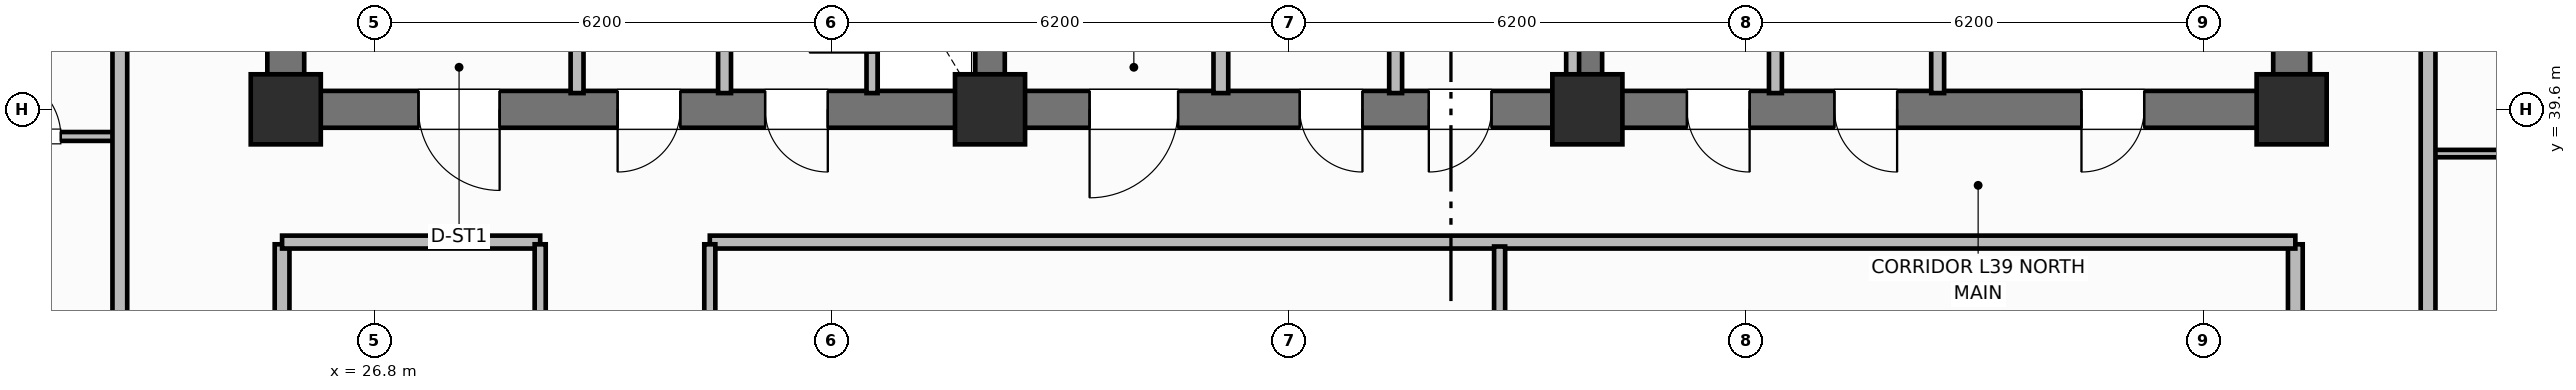
"""IFC4 building model, lengths in metres.
Left out: names, types, materials, properties, quantities, classifications, styles, units other than length and angle.
Written with IfcOpenShell. Run it as: python <this file> out.ifc"""

import sys

from ifc_helpers import new_model, si_unit, direction, frame, frame_2d, origin, origin_2d, place, context, subcontext, project, spatial, rectangle, extrude, element, fill, save


model = new_model("IFC4")
c1 = context("Model", 3, precision=1e-05, world=origin(), true_north=direction((0.0, 1.0)))
c2 = subcontext(c1, "Body", "Model", "MODEL_VIEW")
j1 = project(units=[si_unit("LENGTHUNIT", "METRE"), si_unit("PLANEANGLEUNIT", "RADIAN")], contexts=[c1])
p1 = place(None, origin())
s1 = spatial("IfcSite", under=j1, at=p1, CompositionType="ELEMENT")
p2 = place(p1, origin())
s2 = spatial("IfcBuilding", under=s1, at=p2, CompositionType="ELEMENT")
p3 = place(p2, frame((0.0, 0.0, 158.9)))
s3 = spatial("IfcBuildingStorey", under=s2, at=p3, CompositionType="ELEMENT", Elevation=158.9)
for number, where, z_axis, x_axis in (
    (1, (25.6, 39.85, 0.0), (0.0, 0.0, 1.0), (0.0, 1.0, 0.0)),
    (2, (52.8, 39.85, 0.0), (0.0, 0.0, 1.0), (0.0, 1.0, 0.0)),
):
    element("IfcWall", number, at=place(p3, frame(where, z_axis=z_axis, x_axis=x_axis)), inside=s3, PredefinedType="SHEAR", context=c2, shape_type="SweptSolid", body=[
        extrude(rectangle(XDim=5.7, YDim=0.5, at=frame_2d((2.85, 0.0))), origin(), (0.0, 0.0, 1.0), 3.7),
    ])
p4 = place(p3, frame((52.8, 39.6, 0.0), z_axis=(0.0, 0.0, 1.0), x_axis=(-1.0, 0.0, 0.0)))
e3 = element("IfcWall", 3, at=p4, inside=s3, PredefinedType="SHEAR", context=c2, shape_type="SweptSolid", body=[
    extrude(rectangle(XDim=27.2, YDim=0.5, at=frame_2d((13.6, 0.0))), origin(), (0.0, 0.0, 1.0), 3.7),
])
p5 = place(p4, frame((24.3, 0.0, 0.0)))
e4 = element("IfcOpeningElement", 4, at=p5, cuts=e3, PredefinedType="OPENING", context=c2, shape_type="SweptSolid", body=[
    extrude(rectangle(XDim=1.1, YDim=2.15, at=frame_2d((0.55, 1.075))), frame((0.0, 0.26, 0.0), z_axis=(0.0, -1.0, 0.0), x_axis=(1.0, 0.0, 0.0)), (0.0, 0.0, 1.0), 0.52),
])
p6 = place(p4, frame((21.85, 0.0, 0.0)))
e5 = element("IfcOpeningElement", 5, at=p6, cuts=e3, PredefinedType="OPENING", context=c2, shape_type="SweptSolid", body=[
    extrude(rectangle(XDim=0.85, YDim=2.1, at=frame_2d((0.425, 1.05))), frame((0.0, 0.26, 0.0), z_axis=(0.0, -1.0, 0.0), x_axis=(1.0, 0.0, 0.0)), (0.0, 0.0, 1.0), 0.52),
])
p7 = place(p4, frame((19.85, 0.0, 0.0)))
e6 = element("IfcOpeningElement", 6, at=p7, cuts=e3, PredefinedType="OPENING", context=c2, shape_type="SweptSolid", body=[
    extrude(rectangle(XDim=0.85, YDim=2.1, at=frame_2d((0.425, 1.05))), frame((0.0, 0.26, 0.0), z_axis=(0.0, -1.0, 0.0), x_axis=(1.0, 0.0, 0.0)), (0.0, 0.0, 1.0), 0.52),
])
p8 = place(p4, frame((15.1, 0.0, 0.0)))
e7 = element("IfcOpeningElement", 7, at=p8, cuts=e3, PredefinedType="OPENING", context=c2, shape_type="SweptSolid", body=[
    extrude(rectangle(XDim=1.2, YDim=2.15, at=frame_2d((0.6, 1.075))), frame((0.0, 0.26, 0.0), z_axis=(0.0, -1.0, 0.0), x_axis=(1.0, 0.0, 0.0)), (0.0, 0.0, 1.0), 0.52),
])
p9 = place(p4, frame((12.6, 0.0, 0.0)))
e8 = element("IfcOpeningElement", 8, at=p9, cuts=e3, PredefinedType="OPENING", context=c2, shape_type="SweptSolid", body=[
    extrude(rectangle(XDim=0.85, YDim=2.1, at=frame_2d((0.425, 1.05))), frame((0.0, 0.26, 0.0), z_axis=(0.0, -1.0, 0.0), x_axis=(1.0, 0.0, 0.0)), (0.0, 0.0, 1.0), 0.52),
])
p10 = place(p4, frame((10.85, 0.0, 0.0)))
e9 = element("IfcOpeningElement", 9, at=p10, cuts=e3, PredefinedType="OPENING", context=c2, shape_type="SweptSolid", body=[
    extrude(rectangle(XDim=0.85, YDim=2.1, at=frame_2d((0.425, 1.05))), frame((0.0, 0.26, 0.0), z_axis=(0.0, -1.0, 0.0), x_axis=(1.0, 0.0, 0.0)), (0.0, 0.0, 1.0), 0.52),
])
p11 = place(p4, frame((7.35, 0.0, 0.0)))
e10 = element("IfcOpeningElement", 10, at=p11, cuts=e3, PredefinedType="OPENING", context=c2, shape_type="SweptSolid", body=[
    extrude(rectangle(XDim=0.85, YDim=2.1, at=frame_2d((0.425, 1.05))), frame((0.0, 0.26, 0.0), z_axis=(0.0, -1.0, 0.0), x_axis=(1.0, 0.0, 0.0)), (0.0, 0.0, 1.0), 0.52),
])
p12 = place(p4, frame((5.35, 0.0, 0.0)))
e11 = element("IfcOpeningElement", 11, at=p12, cuts=e3, PredefinedType="OPENING", context=c2, shape_type="SweptSolid", body=[
    extrude(rectangle(XDim=0.85, YDim=2.1, at=frame_2d((0.425, 1.05))), frame((0.0, 0.26, 0.0), z_axis=(0.0, -1.0, 0.0), x_axis=(1.0, 0.0, 0.0)), (0.0, 0.0, 1.0), 0.52),
])
p13 = place(p4, frame((2.0, 0.0, 0.0)))
e12 = element("IfcOpeningElement", 12, at=p13, cuts=e3, PredefinedType="OPENING", context=c2, shape_type="SweptSolid", body=[
    extrude(rectangle(XDim=0.85, YDim=2.1, at=frame_2d((0.425, 1.05))), frame((0.0, 0.26, 0.0), z_axis=(0.0, -1.0, 0.0), x_axis=(1.0, 0.0, 0.0)), (0.0, 0.0, 1.0), 0.52),
])
for number, where, z_axis, x_axis in (
    (13, (35.15, 39.85, 0.0), (0.0, 0.0, 1.0), (0.0, 1.0, 0.0)),
    (14, (43.25, 39.85, 0.0), (0.0, 0.0, 1.0), (0.0, 1.0, 0.0)),
):
    element("IfcWall", number, at=place(p3, frame(where, z_axis=z_axis, x_axis=x_axis)), inside=s3, PredefinedType="SHEAR", context=c2, shape_type="SweptSolid", body=[
        extrude(rectangle(XDim=5.7, YDim=0.4, at=frame_2d((2.85, 0.0))), origin(), (0.0, 0.0, 1.0), 3.7),
    ])
for number, where, z_axis, x_axis in (
    (15, (25.6, 39.6, 0.0), (0.0, 0.0, 1.0), (1.0, 0.0, 0.0)),
    (16, (35.15, 39.6, 0.0), (0.0, 0.0, 1.0), (1.0, 0.0, 0.0)),
    (17, (43.25, 39.6, 0.0), (0.0, 0.0, 1.0), (1.0, 0.0, 0.0)),
    (18, (52.8, 39.6, 0.0), (0.0, 0.0, 1.0), (1.0, 0.0, 0.0)),
):
    element("IfcColumn", number, at=place(p3, frame(where, z_axis=z_axis, x_axis=x_axis)), inside=s3, PredefinedType="COLUMN", context=c2, shape_type="SweptSolid", body=[
        extrude(rectangle(XDim=0.95, YDim=0.95, at=origin_2d()), origin(), (0.0, 0.0, 1.0), 3.7),
    ])
p14 = place(p3, frame((33.55, 39.82, 0.0), z_axis=(0.0, 0.0, 1.0), x_axis=(0.0, 1.0, 0.0)))
e19 = element("IfcWall", 19, at=p14, inside=s3, PredefinedType="PARTITIONING", context=c2, shape_type="SweptSolid", body=[
    extrude(rectangle(XDim=2.13, YDim=0.15, at=frame_2d((1.065, 0.0))), origin(), (0.0, 0.0, 1.0), 2.55),
])
p15 = place(p14, frame((0.55, 0.0, 0.0)))
e20 = element("IfcOpeningElement", 20, at=p15, cuts=e19, PredefinedType="OPENING", context=c2, shape_type="SweptSolid", body=[
    extrude(rectangle(XDim=0.85, YDim=2.05, at=frame_2d((0.425, 1.025))), frame((0.0, 0.085, 0.0), z_axis=(0.0, -1.0, 0.0), x_axis=(1.0, 0.0, 0.0)), (0.0, 0.0, 1.0), 0.17),
])
for number, where, z_axis, x_axis in (
    (21, (29.55, 39.82, 0.0), (0.0, 0.0, 1.0), (0.0, 1.0, 0.0)),
    (22, (31.55, 39.82, 0.0), (0.0, 0.0, 1.0), (0.0, 1.0, 0.0)),
):
    element("IfcWall", number, at=place(p3, frame(where, z_axis=z_axis, x_axis=x_axis)), inside=s3, PredefinedType="PARTITIONING", context=c2, shape_type="SweptSolid", body=[
        extrude(rectangle(XDim=2.13, YDim=0.175, at=frame_2d((1.065, 0.0))), origin(), (0.0, 0.0, 1.0), 2.55),
    ])
p16 = place(p3, frame((38.28, 39.82, 0.0), z_axis=(0.0, 0.0, 1.0), x_axis=(0.0, 1.0, 0.0)))
e23 = element("IfcWall", 23, at=p16, inside=s3, PredefinedType="PARTITIONING", context=c2, shape_type="SweptSolid", body=[
    extrude(rectangle(XDim=5.63, YDim=0.2, at=frame_2d((2.815, 0.0))), origin(), (0.0, 0.0, 1.0), 2.55),
])
for number, where, z_axis, x_axis in (
    (24, (43.05, 39.82, 0.0), (0.0, 0.0, 1.0), (0.0, 1.0, 0.0)),
    (25, (40.65, 39.82, 0.0), (0.0, 0.0, 1.0), (0.0, 1.0, 0.0)),
    (26, (45.8, 39.82, 0.0), (0.0, 0.0, 1.0), (0.0, 1.0, 0.0)),
):
    element("IfcWall", number, at=place(p3, frame(where, z_axis=z_axis, x_axis=x_axis)), inside=s3, PredefinedType="PARTITIONING", context=c2, shape_type="SweptSolid", body=[
        extrude(rectangle(XDim=5.63, YDim=0.175, at=frame_2d((2.815, 0.0))), origin(), (0.0, 0.0, 1.0), 2.55),
    ])
p17 = place(p3, frame((48.0, 39.82, 0.0), z_axis=(0.0, 0.0, 1.0), x_axis=(0.0, 1.0, 0.0)))
e27 = element("IfcWall", 27, at=p17, inside=s3, PredefinedType="PARTITIONING", context=c2, shape_type="SweptSolid", body=[
    extrude(rectangle(XDim=2.73, YDim=0.175, at=frame_2d((1.365, 0.0))), origin(), (0.0, 0.0, 1.0), 2.55),
])
for number, where, z_axis, x_axis in (
    (28, (25.55, 18.63, 0.0), (0.0, 0.0, 1.0), (0.0, 1.0, 0.0)),
    (29, (52.85, 18.63, 0.0), (0.0, 0.0, 1.0), (0.0, 1.0, 0.0)),
):
    element("IfcWall", number, at=place(p3, frame(where, z_axis=z_axis, x_axis=x_axis)), inside=s3, PredefinedType="PARTITIONING", context=c2, shape_type="SweptSolid", body=[
        extrude(rectangle(XDim=19.14, YDim=0.2, at=frame_2d((9.57, 0.0))), origin(), (0.0, 0.0, 1.0), 2.55),
    ])
p18 = place(p3, frame((25.55, 37.8, 0.0), z_axis=(0.0, 0.0, 1.0), x_axis=(1.0, 0.0, 0.0)))
e30 = element("IfcWall", 30, at=p18, inside=s3, PredefinedType="PARTITIONING", context=c2, shape_type="SweptSolid", body=[
    extrude(rectangle(XDim=3.5, YDim=0.175, at=frame_2d((1.75, 0.0))), origin(), (0.0, 0.0, 1.0), 2.55),
])
p19 = place(p3, frame((31.35, 37.8, 0.0), z_axis=(0.0, 0.0, 1.0), x_axis=(1.0, 0.0, 0.0)))
e31 = element("IfcWall", 31, at=p19, inside=s3, PredefinedType="PARTITIONING", context=c2, shape_type="SweptSolid", body=[
    extrude(rectangle(XDim=21.5, YDim=0.175, at=frame_2d((10.75, 0.0))), origin(), (0.0, 0.0, 1.0), 2.55),
])
p20 = place(p3, frame((42.06, 18.66, 0.0), z_axis=(0.0, 0.0, 1.0), x_axis=(0.0, 1.0, 0.0)))
e32 = element("IfcWall", 32, at=p20, inside=s3, PredefinedType="PARTITIONING", context=c2, shape_type="SweptSolid", body=[
    extrude(rectangle(XDim=19.08, YDim=0.15, at=frame_2d((9.54, 0.0))), origin(), (0.0, 0.0, 1.0), 2.55),
])
p21 = place(p20, frame((6.5, 0.0, 0.0)))
e33 = element("IfcOpeningElement", 33, at=p21, cuts=e32, PredefinedType="OPENING", context=c2, shape_type="SweptSolid", body=[
    extrude(rectangle(XDim=1.0, YDim=2.15, at=frame_2d((0.5, 1.075))), frame((0.0, 0.085, 0.0), z_axis=(0.0, -1.0, 0.0), x_axis=(1.0, 0.0, 0.0)), (0.0, 0.0, 1.0), 0.17),
])
p22 = place(p3, frame((29.05, 18.63, 0.0), z_axis=(0.0, 0.0, 1.0), x_axis=(0.0, 1.0, 0.0)))
e34 = element("IfcWall", 34, at=p22, inside=s3, PredefinedType="PARTITIONING", context=c2, shape_type="SweptSolid", body=[
    extrude(rectangle(XDim=19.14, YDim=0.15, at=frame_2d((9.57, 0.0))), origin(), (0.0, 0.0, 1.0), 2.55),
])
p23 = place(p22, frame((5.5, 0.0, 0.0)))
e35 = element("IfcOpeningElement", 35, at=p23, cuts=e34, PredefinedType="OPENING", context=c2, shape_type="SweptSolid", body=[
    extrude(rectangle(XDim=1.0, YDim=2.15, at=frame_2d((0.5, 1.075))), frame((0.0, 0.085, 0.0), z_axis=(0.0, -1.0, 0.0), x_axis=(1.0, 0.0, 0.0)), (0.0, 0.0, 1.0), 0.17),
])
p24 = place(p3, frame((31.35, 18.63, 0.0), z_axis=(0.0, 0.0, 1.0), x_axis=(0.0, 1.0, 0.0)))
e36 = element("IfcWall", 36, at=p24, inside=s3, PredefinedType="PARTITIONING", context=c2, shape_type="SweptSolid", body=[
    extrude(rectangle(XDim=19.14, YDim=0.15, at=frame_2d((9.57, 0.0))), origin(), (0.0, 0.0, 1.0), 2.55),
])
p25 = place(p24, frame((5.5, 0.0, 0.0)))
e37 = element("IfcOpeningElement", 37, at=p25, cuts=e36, PredefinedType="OPENING", context=c2, shape_type="SweptSolid", body=[
    extrude(rectangle(XDim=1.0, YDim=2.15, at=frame_2d((0.5, 1.075))), frame((0.0, 0.085, 0.0), z_axis=(0.0, -1.0, 0.0), x_axis=(1.0, 0.0, 0.0)), (0.0, 0.0, 1.0), 0.17),
])
p26 = place(p3, frame((21.1, 39.232, 0.0), z_axis=(0.0, 0.0, 1.0), x_axis=(1.0, 0.0, 0.0)))
e38 = element("IfcWall", 38, at=p26, inside=s3, PredefinedType="PARTITIONING", context=c2, shape_type="SweptSolid", body=[
    extrude(rectangle(XDim=2.25, YDim=0.12, at=frame_2d((1.125, 0.0))), origin(), (0.0, 0.0, 1.0), 2.55),
])
p27 = place(p26, frame((0.6, 0.0, 0.0)))
e39 = element("IfcOpeningElement", 39, at=p27, cuts=e38, PredefinedType="OPENING", context=c2, shape_type="SweptSolid", body=[
    extrude(rectangle(XDim=0.85, YDim=2.1, at=frame_2d((0.425, 1.05))), frame((0.0, 0.07, 0.0), z_axis=(0.0, -1.0, 0.0), x_axis=(1.0, 0.0, 0.0)), (0.0, 0.0, 1.0), 0.14),
])
p28 = place(p3, frame((23.35, 10.6, 0.0), z_axis=(0.0, 0.0, 1.0), x_axis=(0.0, 1.0, 0.0)))
e40 = element("IfcWall", 40, at=p28, inside=s3, PredefinedType="PARTITIONING", context=c2, shape_type="SweptSolid", body=[
    extrude(rectangle(XDim=35.2, YDim=0.2, at=frame_2d((17.6, 0.0))), origin(), (0.0, 0.0, 1.0), 2.55),
])
p29 = place(p28, frame((2.65, 0.0, 0.0)))
e41 = element("IfcOpeningElement", 41, at=p29, cuts=e40, PredefinedType="OPENING", context=c2, shape_type="SweptSolid", body=[
    extrude(rectangle(XDim=1.0, YDim=2.15, at=frame_2d((0.5, 1.075))), frame((0.0, 0.11, 0.0), z_axis=(0.0, -1.0, 0.0), x_axis=(1.0, 0.0, 0.0)), (0.0, 0.0, 1.0), 0.22),
])
p30 = place(p28, frame((12.65, 0.0, 0.0)))
e42 = element("IfcOpeningElement", 42, at=p30, cuts=e40, PredefinedType="OPENING", context=c2, shape_type="SweptSolid", body=[
    extrude(rectangle(XDim=1.0, YDim=2.15, at=frame_2d((0.5, 1.075))), frame((0.0, 0.11, 0.0), z_axis=(0.0, -1.0, 0.0), x_axis=(1.0, 0.0, 0.0)), (0.0, 0.0, 1.0), 0.22),
])
p31 = place(p28, frame((23.782, 0.0, 0.0)))
e43 = element("IfcOpeningElement", 43, at=p31, cuts=e40, PredefinedType="OPENING", context=c2, shape_type="SweptSolid", body=[
    extrude(rectangle(XDim=1.0, YDim=2.15, at=frame_2d((0.5, 1.075))), frame((0.0, 0.11, 0.0), z_axis=(0.0, -1.0, 0.0), x_axis=(1.0, 0.0, 0.0)), (0.0, 0.0, 1.0), 0.22),
])
p32 = place(p3, frame((54.65, 39.0, 0.0), z_axis=(0.0, 0.0, 1.0), x_axis=(1.0, 0.0, 0.0)))
e44 = element("IfcWall", 44, at=p32, inside=s3, PredefinedType="PARTITIONING", context=c2, shape_type="SweptSolid", body=[
    extrude(rectangle(XDim=2.25, YDim=0.1, at=frame_2d((1.125, 0.0))), origin(), (0.0, 0.0, 1.0), 2.55),
])
p33 = place(p3, frame((54.65, 10.6, 0.0), z_axis=(0.0, 0.0, 1.0), x_axis=(0.0, 1.0, 0.0)))
e45 = element("IfcWall", 45, at=p33, inside=s3, PredefinedType="PARTITIONING", context=c2, shape_type="SweptSolid", body=[
    extrude(rectangle(XDim=35.2, YDim=0.2, at=frame_2d((17.6, 0.0))), origin(), (0.0, 0.0, 1.0), 2.55),
])
p34 = place(p33, frame((2.65, 0.0, 0.0)))
e46 = element("IfcOpeningElement", 46, at=p34, cuts=e45, PredefinedType="OPENING", context=c2, shape_type="SweptSolid", body=[
    extrude(rectangle(XDim=1.0, YDim=2.15, at=frame_2d((0.5, 1.075))), frame((0.0, 0.11, 0.0), z_axis=(0.0, -1.0, 0.0), x_axis=(1.0, 0.0, 0.0)), (0.0, 0.0, 1.0), 0.22),
])
p35 = place(p33, frame((22.75, 0.0, 0.0)))
e47 = element("IfcOpeningElement", 47, at=p35, cuts=e45, PredefinedType="OPENING", context=c2, shape_type="SweptSolid", body=[
    extrude(rectangle(XDim=1.0, YDim=2.15, at=frame_2d((0.5, 1.075))), frame((0.0, 0.11, 0.0), z_axis=(0.0, -1.0, 0.0), x_axis=(1.0, 0.0, 0.0)), (0.0, 0.0, 1.0), 0.22),
])
p36 = place(p15, origin())
e48 = element("IfcDoor", 48, at=p36, inside=s3, OperationType="SINGLE_SWING_LEFT", PredefinedType="TRAPDOOR", context=c2, shape_type="SweptSolid", body=[
    extrude(rectangle(XDim=0.85, YDim=2.05, at=frame_2d((0.425, 1.025))), frame((0.0, 0.025, 0.0), z_axis=(0.0, -1.0, 0.0), x_axis=(1.0, 0.0, 0.0)), (0.0, 0.0, 1.0), 0.05),
])
fill(e20, e48)
p37 = place(p27, origin())
e49 = element("IfcDoor", 49, at=p37, inside=s3, OperationType="SINGLE_SWING_LEFT", PredefinedType="DOOR", context=c2, shape_type="SweptSolid", body=[
    extrude(rectangle(XDim=0.85, YDim=2.1, at=frame_2d((0.425, 1.05))), frame((0.0, 0.025, 0.0), z_axis=(0.0, -1.0, 0.0), x_axis=(1.0, 0.0, 0.0)), (0.0, 0.0, 1.0), 0.05),
])
fill(e39, e49)
p38 = place(p5, origin())
e50 = element("IfcDoor", 50, at=p38, inside=s3, OperationType="SINGLE_SWING_LEFT", PredefinedType="DOOR", context=c2, shape_type="SweptSolid", body=[
    extrude(rectangle(XDim=1.1, YDim=2.15, at=frame_2d((0.55, 1.075))), frame((0.0, 0.025, 0.0), z_axis=(0.0, -1.0, 0.0), x_axis=(1.0, 0.0, 0.0)), (0.0, 0.0, 1.0), 0.05),
])
fill(e4, e50)
p39 = place(p6, origin())
e51 = element("IfcDoor", 51, at=p39, inside=s3, OperationType="SINGLE_SWING_RIGHT", PredefinedType="DOOR", context=c2, shape_type="SweptSolid", body=[
    extrude(rectangle(XDim=0.85, YDim=2.1, at=frame_2d((0.425, 1.05))), frame((0.0, 0.025, 0.0), z_axis=(0.0, -1.0, 0.0), x_axis=(1.0, 0.0, 0.0)), (0.0, 0.0, 1.0), 0.05),
])
fill(e5, e51)
p40 = place(p7, origin())
e52 = element("IfcDoor", 52, at=p40, inside=s3, OperationType="SINGLE_SWING_LEFT", PredefinedType="DOOR", context=c2, shape_type="SweptSolid", body=[
    extrude(rectangle(XDim=0.85, YDim=2.1, at=frame_2d((0.425, 1.05))), frame((0.0, 0.025, 0.0), z_axis=(0.0, -1.0, 0.0), x_axis=(1.0, 0.0, 0.0)), (0.0, 0.0, 1.0), 0.05),
])
fill(e6, e52)
p41 = place(p8, origin())
e53 = element("IfcDoor", 53, at=p41, inside=s3, OperationType="SINGLE_SWING_RIGHT", PredefinedType="DOOR", context=c2, shape_type="SweptSolid", body=[
    extrude(rectangle(XDim=1.2, YDim=2.15, at=frame_2d((0.6, 1.075))), frame((0.0, 0.025, 0.0), z_axis=(0.0, -1.0, 0.0), x_axis=(1.0, 0.0, 0.0)), (0.0, 0.0, 1.0), 0.05),
])
fill(e7, e53)
p42 = place(p9, origin())
e54 = element("IfcDoor", 54, at=p42, inside=s3, OperationType="SINGLE_SWING_LEFT", PredefinedType="DOOR", context=c2, shape_type="SweptSolid", body=[
    extrude(rectangle(XDim=0.85, YDim=2.1, at=frame_2d((0.425, 1.05))), frame((0.0, 0.025, 0.0), z_axis=(0.0, -1.0, 0.0), x_axis=(1.0, 0.0, 0.0)), (0.0, 0.0, 1.0), 0.05),
])
fill(e8, e54)
p43 = place(p10, origin())
e55 = element("IfcDoor", 55, at=p43, inside=s3, OperationType="SINGLE_SWING_RIGHT", PredefinedType="DOOR", context=c2, shape_type="SweptSolid", body=[
    extrude(rectangle(XDim=0.85, YDim=2.1, at=frame_2d((0.425, 1.05))), frame((0.0, 0.025, 0.0), z_axis=(0.0, -1.0, 0.0), x_axis=(1.0, 0.0, 0.0)), (0.0, 0.0, 1.0), 0.05),
])
fill(e9, e55)
p44 = place(p11, origin())
e56 = element("IfcDoor", 56, at=p44, inside=s3, OperationType="SINGLE_SWING_LEFT", PredefinedType="DOOR", context=c2, shape_type="SweptSolid", body=[
    extrude(rectangle(XDim=0.85, YDim=2.1, at=frame_2d((0.425, 1.05))), frame((0.0, 0.025, 0.0), z_axis=(0.0, -1.0, 0.0), x_axis=(1.0, 0.0, 0.0)), (0.0, 0.0, 1.0), 0.05),
])
fill(e10, e56)
p45 = place(p12, origin())
e57 = element("IfcDoor", 57, at=p45, inside=s3, OperationType="SINGLE_SWING_LEFT", PredefinedType="DOOR", context=c2, shape_type="SweptSolid", body=[
    extrude(rectangle(XDim=0.85, YDim=2.1, at=frame_2d((0.425, 1.05))), frame((0.0, 0.025, 0.0), z_axis=(0.0, -1.0, 0.0), x_axis=(1.0, 0.0, 0.0)), (0.0, 0.0, 1.0), 0.05),
])
fill(e11, e57)
p46 = place(p13, origin())
e58 = element("IfcDoor", 58, at=p46, inside=s3, OperationType="SINGLE_SWING_RIGHT", PredefinedType="DOOR", context=c2, shape_type="SweptSolid", body=[
    extrude(rectangle(XDim=0.85, YDim=2.1, at=frame_2d((0.425, 1.05))), frame((0.0, 0.025, 0.0), z_axis=(0.0, -1.0, 0.0), x_axis=(1.0, 0.0, 0.0)), (0.0, 0.0, 1.0), 0.05),
])
fill(e12, e58)
save(model, sys.argv[1])
